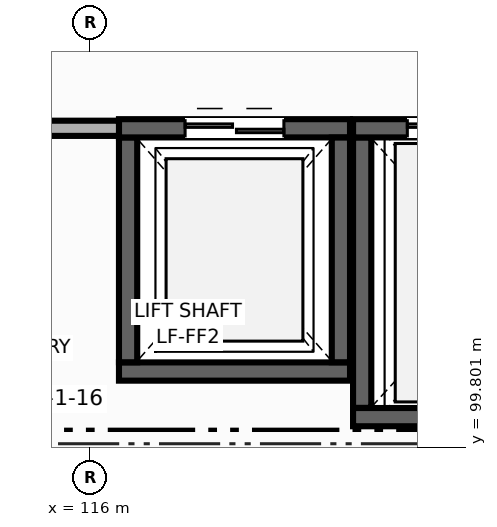
"""IFC4 building model, lengths in metres.
Left out: names, types, materials, properties, quantities, classifications, styles, units other than length and angle.
Written with IfcOpenShell. Run it as: python <this file> out.ifc"""

import sys

from ifc_helpers import new_model, si_unit, direction, frame, frame_2d, origin, place, context, subcontext, project, spatial, rectangle, extrude, element, fill, save


model = new_model("IFC4")
c1 = context("Model", 3, precision=1e-05, world=origin(), true_north=direction((0.0, 1.0)))
c2 = subcontext(c1, "Body", "Model", "MODEL_VIEW")
j1 = project(units=[si_unit("LENGTHUNIT", "METRE"), si_unit("PLANEANGLEUNIT", "RADIAN")], contexts=[c1])
p1 = place(None, origin())
s1 = spatial("IfcSite", under=j1, at=p1, CompositionType="ELEMENT")
p2 = place(p1, origin())
s2 = spatial("IfcBuilding", under=s1, at=p2, CompositionType="ELEMENT")
p3 = place(p2, frame((0.0, 0.0, 5.4)))
s3 = spatial("IfcBuildingStorey", under=s2, at=p3, CompositionType="ELEMENT", Elevation=5.4)
p4 = place(p3, frame((119.42, 100.8, 0.0), z_axis=(0.0, 0.0, 1.0), x_axis=(-1.0, 0.0, 0.0)))
e1 = element("IfcWall", 1, at=p4, inside=s3, PredefinedType="SHEAR", context=c2, shape_type="SweptSolid", body=[
    extrude(rectangle(XDim=3.04, YDim=0.24, at=frame_2d((1.52, 0.0))), origin(), (0.0, 0.0, 1.0), 4.26),
])
p5 = place(p3, frame((116.5, 100.922, 0.0), z_axis=(0.0, 0.0, 1.0), x_axis=(0.0, 1.0, 0.0)))
e2 = element("IfcWall", 2, at=p5, inside=s3, PredefinedType="SHEAR", context=c2, shape_type="SweptSolid", body=[
    extrude(rectangle(XDim=2.958, YDim=0.24, at=frame_2d((1.479, 0.0))), origin(), (0.0, 0.0, 1.0), 4.26),
])
p6 = place(p3, frame((116.38, 104.0, 0.0), z_axis=(0.0, 0.0, 1.0), x_axis=(1.0, 0.0, 0.0)))
e3 = element("IfcWall", 3, at=p6, inside=s3, PredefinedType="SHEAR", context=c2, shape_type="SweptSolid", body=[
    extrude(rectangle(XDim=3.04, YDim=0.24, at=frame_2d((1.52, 0.0))), origin(), (0.0, 0.0, 1.0), 4.26),
])
p7 = place(p6, frame((0.87, 0.0, 0.0)))
e4 = element("IfcOpeningElement", 4, at=p7, cuts=e3, PredefinedType="OPENING", context=c2, shape_type="SweptSolid", body=[
    extrude(rectangle(XDim=1.3, YDim=2.15, at=frame_2d((0.65, 1.075))), frame((0.0, 0.13, 0.0), z_axis=(0.0, -1.0, 0.0), x_axis=(1.0, 0.0, 0.0)), (0.0, 0.0, 1.0), 0.26),
])
p8 = place(p3, frame((119.3, 103.878, 0.0), z_axis=(0.0, 0.0, 1.0), x_axis=(0.0, -1.0, 0.0)))
e5 = element("IfcWall", 5, at=p8, inside=s3, PredefinedType="SHEAR", context=c2, shape_type="SweptSolid", body=[
    extrude(rectangle(XDim=2.956, YDim=0.24, at=frame_2d((1.478, 0.0))), origin(), (0.0, 0.0, 1.0), 4.26),
])
p9 = place(p3, frame((123.088, 100.2, 0.0), z_axis=(0.0, 0.0, 1.0), x_axis=(-1.0, 0.0, 0.0)))
e6 = element("IfcWall", 6, at=p9, inside=s3, PredefinedType="SHEAR", context=c2, shape_type="SweptSolid", body=[
    extrude(rectangle(XDim=3.628, YDim=0.24, at=frame_2d((1.814, 0.0))), origin(), (0.0, 0.0, 1.0), 4.26),
])
p10 = place(p3, frame((119.58, 100.322, 0.0), z_axis=(0.0, 0.0, 1.0), x_axis=(0.0, 1.0, 0.0)))
e7 = element("IfcWall", 7, at=p10, inside=s3, PredefinedType="SHEAR", context=c2, shape_type="SweptSolid", body=[
    extrude(rectangle(XDim=3.558, YDim=0.24, at=frame_2d((1.779, 0.0))), origin(), (0.0, 0.0, 1.0), 4.26),
])
p11 = place(p3, frame((119.46, 104.0, 0.0), z_axis=(0.0, 0.0, 1.0), x_axis=(1.0, 0.0, 0.0)))
e8 = element("IfcWall", 8, at=p11, inside=s3, PredefinedType="SHEAR", context=c2, shape_type="SweptSolid", body=[
    extrude(rectangle(XDim=3.628, YDim=0.24, at=frame_2d((1.814, 0.0))), origin(), (0.0, 0.0, 1.0), 4.26),
])
p12 = place(p11, frame((0.714, 0.0, 0.0)))
e9 = element("IfcOpeningElement", 9, at=p12, cuts=e8, PredefinedType="OPENING", context=c2, shape_type="SweptSolid", body=[
    extrude(rectangle(XDim=2.2, YDim=2.5, at=frame_2d((1.1, 1.25))), frame((0.0, 0.13, 0.0), z_axis=(0.0, -1.0, 0.0), x_axis=(1.0, 0.0, 0.0)), (0.0, 0.0, 1.0), 0.26),
])
p13 = place(p3, frame((116.38, 104.0, 0.0), z_axis=(0.0, 0.0, 1.0), x_axis=(-1.0, 0.0, 0.0)))
e10 = element("IfcWall", 10, at=p13, inside=s3, PredefinedType="PARTITIONING", context=c2, shape_type="SweptSolid", body=[
    extrude(rectangle(XDim=1.88, YDim=0.2, at=frame_2d((0.94, 0.0))), origin(), (0.0, 0.0, 1.0), 4.26),
])
p14 = place(p7, origin())
e11 = element("IfcDoor", 11, at=p14, inside=s3, OperationType="DOUBLE_DOOR_SLIDING", PredefinedType="DOOR", context=c2, shape_type="SweptSolid", body=[
    extrude(rectangle(XDim=1.3, YDim=2.15, at=frame_2d((0.65, 1.075))), frame((0.0, 0.025, 0.0), z_axis=(0.0, -1.0, 0.0), x_axis=(1.0, 0.0, 0.0)), (0.0, 0.0, 1.0), 0.05),
])
fill(e4, e11)
p15 = place(p12, origin())
e12 = element("IfcDoor", 12, at=p15, inside=s3, OperationType="DOUBLE_DOOR_SLIDING", PredefinedType="DOOR", context=c2, shape_type="SweptSolid", body=[
    extrude(rectangle(XDim=2.2, YDim=2.5, at=frame_2d((1.1, 1.25))), frame((0.0, 0.025, 0.0), z_axis=(0.0, -1.0, 0.0), x_axis=(1.0, 0.0, 0.0)), (0.0, 0.0, 1.0), 0.05),
])
fill(e9, e12)
save(model, sys.argv[1])
